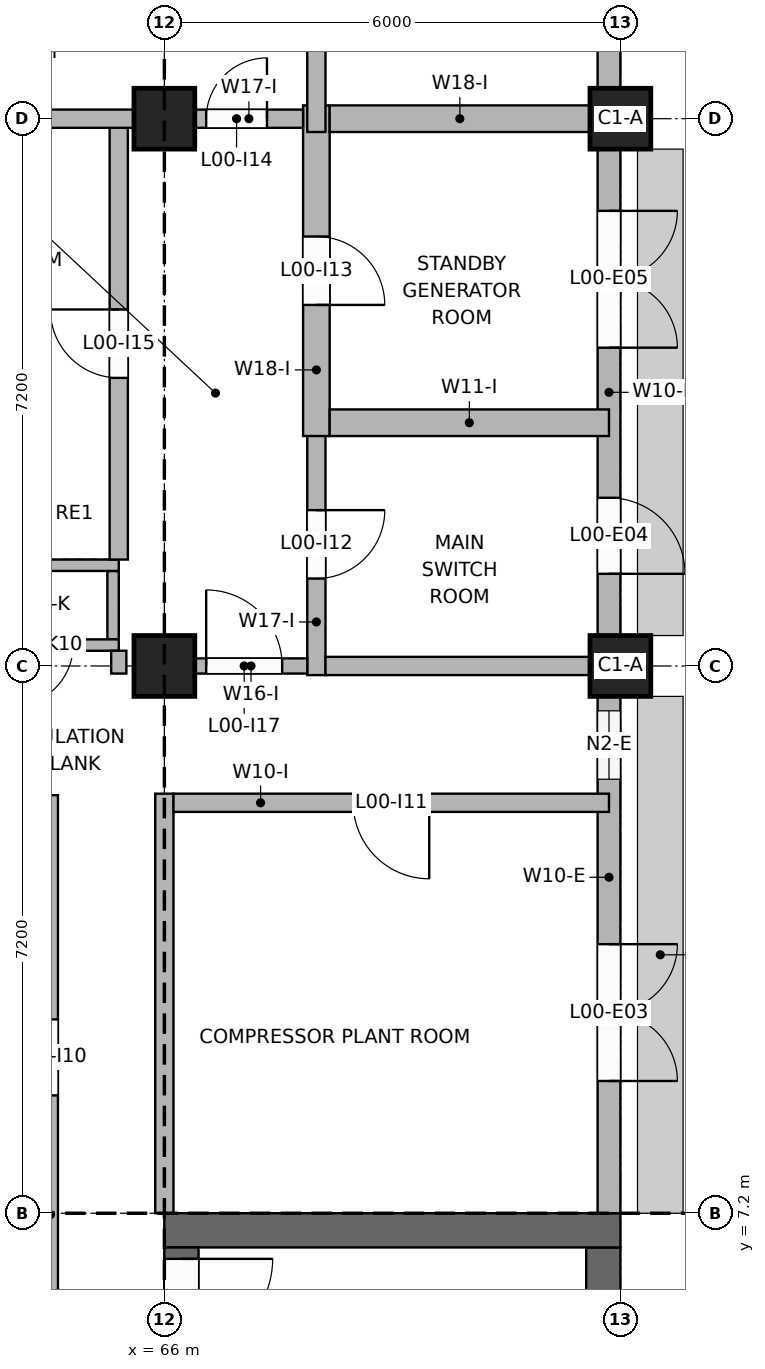
"""IFC4 building model, lengths in metres.
Left out: names, types, materials, properties, quantities, classifications, styles, units other than length and angle.
Written with IfcOpenShell. Run it as: python <this file> out.ifc"""

import sys

from ifc_helpers import new_model, si_unit, direction, frame, frame_2d, origin, origin_2d, place, context, subcontext, project, spatial, rectangle, extrude, element, fill, save


model = new_model("IFC4")
c1 = context("Model", 3, precision=1e-05, world=origin(), true_north=direction((0.0, 1.0)))
c2 = subcontext(c1, "Body", "Model", "MODEL_VIEW")
j1 = project(units=[si_unit("LENGTHUNIT", "METRE"), si_unit("PLANEANGLEUNIT", "RADIAN")], contexts=[c1])
p1 = place(None, origin())
s1 = spatial("IfcSite", under=j1, at=p1, CompositionType="ELEMENT")
p2 = place(p1, origin())
s2 = spatial("IfcBuilding", under=s1, at=p2, CompositionType="ELEMENT")
p3 = place(p2, origin())
s3 = spatial("IfcBuildingStorey", under=s2, at=p3, CompositionType="ELEMENT", Elevation=0.0)
p4 = place(p3, frame((66.0, 6.975, 0.0), z_axis=(0.0, 0.0, 1.0), x_axis=(1.0, 0.0, 0.0)))
e1 = element("IfcWall", 1, at=p4, inside=s3, PredefinedType="SHEAR", context=c2, shape_type="SweptSolid", body=[
    extrude(rectangle(XDim=6.0, YDim=0.45, at=frame_2d((3.0, 0.0))), origin(), (0.0, 0.0, 1.0), 4.0),
])
p5 = place(p3, frame((66.225, 0.45, 0.0), z_axis=(0.0, 0.0, 1.0), x_axis=(0.0, 1.0, 0.0)))
e2 = element("IfcWall", 2, at=p5, inside=s3, PredefinedType="SHEAR", context=c2, shape_type="SweptSolid", body=[
    extrude(rectangle(XDim=6.3, YDim=0.45, at=frame_2d((3.15, 0.0))), origin(), (0.0, 0.0, 1.0), 4.0),
])
p6 = place(p5, frame((4.95, 0.0, 0.0)))
e3 = element("IfcOpeningElement", 3, at=p6, cuts=e2, PredefinedType="OPENING", context=c2, shape_type="SweptSolid", body=[
    extrude(rectangle(XDim=1.2, YDim=2.1, at=frame_2d((0.6, 1.05))), frame((0.0, 0.235, 0.0), z_axis=(0.0, -1.0, 0.0), x_axis=(1.0, 0.0, 0.0)), (0.0, 0.0, 1.0), 0.47),
])
p7 = place(p3, frame((71.775, 0.45, 0.0), z_axis=(0.0, 0.0, 1.0), x_axis=(0.0, 1.0, 0.0)))
e4 = element("IfcWall", 4, at=p7, inside=s3, PredefinedType="SHEAR", context=c2, shape_type="SweptSolid", body=[
    extrude(rectangle(XDim=6.3, YDim=0.45, at=frame_2d((3.15, 0.0))), origin(), (0.0, 0.0, 1.0), 4.0),
])
p8 = place(p3, frame((63.4, 14.675, 0.0), z_axis=(0.0, 0.0, 1.0), x_axis=(1.0, 0.0, 0.0)))
e5 = element("IfcWall", 5, at=p8, inside=s3, PredefinedType="SOLIDWALL", context=c2, shape_type="SweptSolid", body=[
    extrude(rectangle(XDim=2.0, YDim=0.15, at=frame_2d((1.0, 0.0))), origin(), (0.0, 0.0, 1.0), 4.2),
])
p9 = place(p8, frame((0.6, 0.0, 0.0)))
e6 = element("IfcOpeningElement", 6, at=p9, cuts=e5, PredefinedType="OPENING", context=c2, shape_type="SweptSolid", body=[
    extrude(rectangle(XDim=0.8, YDim=2.1, at=frame_2d((0.4, 1.05))), frame((0.0, 0.085, 0.0), z_axis=(0.0, -1.0, 0.0), x_axis=(1.0, 0.0, 0.0)), (0.0, 0.0, 1.0), 0.17),
])
p10 = place(p3, frame((63.4, 15.725, 0.0), z_axis=(0.0, 0.0, 1.0), x_axis=(1.0, 0.0, 0.0)))
e7 = element("IfcWall", 7, at=p10, inside=s3, PredefinedType="SOLIDWALL", context=c2, shape_type="SweptSolid", body=[
    extrude(rectangle(XDim=2.0, YDim=0.15, at=frame_2d((1.0, 0.0))), origin(), (0.0, 0.0, 1.0), 4.2),
])
p11 = place(p3, frame((65.325, 14.75, 0.0), z_axis=(0.0, 0.0, 1.0), x_axis=(0.0, 1.0, 0.0)))
e8 = element("IfcWall", 8, at=p11, inside=s3, PredefinedType="SOLIDWALL", context=c2, shape_type="SweptSolid", body=[
    extrude(rectangle(XDim=0.9, YDim=0.15, at=frame_2d((0.45, 0.0))), origin(), (0.0, 0.0, 1.0), 4.2),
])
for number, where, z_axis, x_axis in (
    (9, (66.0, 14.4, -0.25), (0.0, 0.0, 1.0), (1.0, 0.0, 0.0)),
    (10, (72.0, 14.4, -0.25), (0.0, 0.0, 1.0), (1.0, 0.0, 0.0)),
    (11, (66.0, 21.6, -0.25), (0.0, 0.0, 1.0), (1.0, 0.0, 0.0)),
    (12, (72.0, 21.6, -0.25), (0.0, 0.0, 1.0), (1.0, 0.0, 0.0)),
):
    element("IfcColumn", number, at=place(p3, frame(where, z_axis=z_axis, x_axis=x_axis)), inside=s3, PredefinedType="COLUMN", context=c2, shape_type="SweptSolid", body=[
        extrude(rectangle(XDim=0.8, YDim=0.8, at=origin_2d()), origin(), (0.0, 0.0, 1.0), 4.25),
    ])
p12 = place(p3, frame((71.85, 7.2, 0.0), z_axis=(0.0, 0.0, 1.0), x_axis=(0.0, 1.0, 0.0)))
e13 = element("IfcWall", 13, at=p12, inside=s3, PredefinedType="SOLIDWALL", context=c2, shape_type="SweptSolid", body=[
    extrude(rectangle(XDim=6.8, YDim=0.3, at=frame_2d((3.4, 0.0))), origin(), (0.0, 0.0, 1.0), 3.1),
])
p13 = place(p12, frame((1.74, 0.0, 0.0)))
e14 = element("IfcOpeningElement", 14, at=p13, cuts=e13, PredefinedType="OPENING", context=c2, shape_type="SweptSolid", body=[
    extrude(rectangle(XDim=1.8, YDim=2.4, at=frame_2d((0.9, 1.2))), frame((0.0, 0.16, 0.0), z_axis=(0.0, -1.0, 0.0), x_axis=(1.0, 0.0, 0.0)), (0.0, 0.0, 1.0), 0.32),
])
p14 = place(p12, frame((5.71, 0.0, 0.9)))
e15 = element("IfcOpeningElement", 15, at=p14, cuts=e13, PredefinedType="OPENING", context=c2, shape_type="SweptSolid", body=[
    extrude(rectangle(XDim=0.9, YDim=1.2, at=frame_2d((0.45, 0.6))), frame((0.0, 0.16, 0.0), z_axis=(0.0, -1.0, 0.0), x_axis=(1.0, 0.0, 0.0)), (0.0, 0.0, 1.0), 0.32),
])
p15 = place(p3, frame((71.85, 14.8, 0.0), z_axis=(0.0, 0.0, 1.0), x_axis=(0.0, 1.0, 0.0)))
e16 = element("IfcWall", 16, at=p15, inside=s3, PredefinedType="SOLIDWALL", context=c2, shape_type="SweptSolid", body=[
    extrude(rectangle(XDim=6.4, YDim=0.3, at=frame_2d((3.2, 0.0))), origin(), (0.0, 0.0, 1.0), 3.1),
])
p16 = place(p15, frame((0.812, 0.0, 0.0)))
e17 = element("IfcOpeningElement", 17, at=p16, cuts=e16, PredefinedType="OPENING", context=c2, shape_type="SweptSolid", body=[
    extrude(rectangle(XDim=1.0, YDim=2.4, at=frame_2d((0.5, 1.2))), frame((0.0, 0.16, 0.0), z_axis=(0.0, -1.0, 0.0), x_axis=(1.0, 0.0, 0.0)), (0.0, 0.0, 1.0), 0.32),
])
p17 = place(p15, frame((3.788, 0.0, 0.0)))
e18 = element("IfcOpeningElement", 18, at=p17, cuts=e16, PredefinedType="OPENING", context=c2, shape_type="SweptSolid", body=[
    extrude(rectangle(XDim=1.8, YDim=2.4, at=frame_2d((0.9, 1.2))), frame((0.0, 0.16, 0.0), z_axis=(0.0, -1.0, 0.0), x_axis=(1.0, 0.0, 0.0)), (0.0, 0.0, 1.0), 0.32),
])
p18 = place(p3, frame((71.85, 22.0, 0.0), z_axis=(0.0, 0.0, 1.0), x_axis=(0.0, 1.0, 0.0)))
e19 = element("IfcWall", 19, at=p18, inside=s3, PredefinedType="SOLIDWALL", context=c2, shape_type="SweptSolid", body=[
    extrude(rectangle(XDim=5.4, YDim=0.3, at=frame_2d((2.7, 0.0))), origin(), (0.0, 0.0, 1.0), 4.0),
])
p19 = place(p18, frame((0.9, 0.0, 0.0)))
e20 = element("IfcOpeningElement", 20, at=p19, cuts=e19, PredefinedType="OPENING", context=c2, shape_type="SweptSolid", body=[
    extrude(rectangle(XDim=3.6, YDim=3.6, at=frame_2d((1.8, 1.8))), frame((0.0, 0.16, 0.0), z_axis=(0.0, -1.0, 0.0), x_axis=(1.0, 0.0, 0.0)), (0.0, 0.0, 1.0), 0.32),
])
p20 = place(p3, frame((64.5, 5.8, 0.0), z_axis=(0.0, 0.0, 1.0), x_axis=(0.0, 1.0, 0.0)))
e21 = element("IfcWall", 21, at=p20, inside=s3, PredefinedType="PARTITIONING", context=c2, shape_type="SweptSolid", body=[
    extrude(rectangle(XDim=6.9, YDim=0.2, at=frame_2d((3.45, 0.0))), origin(), (0.0, 0.0, 1.0), 3.2),
])
p21 = place(p20, frame((2.95, 0.0, 0.0)))
e22 = element("IfcOpeningElement", 22, at=p21, cuts=e21, PredefinedType="OPENING", context=c2, shape_type="SweptSolid", body=[
    extrude(rectangle(XDim=1.0, YDim=2.1, at=frame_2d((0.5, 1.05))), frame((0.0, 0.11, 0.0), z_axis=(0.0, -1.0, 0.0), x_axis=(1.0, 0.0, 0.0)), (0.0, 0.0, 1.0), 0.22),
])
p22 = place(p3, frame((65.4, 14.3, 0.0), z_axis=(0.0, 0.0, 1.0), x_axis=(0.0, 1.0, 0.0)))
e23 = element("IfcWall", 23, at=p22, inside=s3, PredefinedType="PARTITIONING", context=c2, shape_type="SweptSolid", body=[
    extrude(rectangle(XDim=0.3, YDim=0.2, at=frame_2d((0.15, 0.0))), origin(), (0.0, 0.0, 1.0), 3.2),
])
p23 = place(p3, frame((65.4, 15.8, 0.0), z_axis=(0.0, 0.0, 1.0), x_axis=(0.0, 1.0, 0.0)))
e24 = element("IfcWall", 24, at=p23, inside=s3, PredefinedType="PARTITIONING", context=c2, shape_type="SweptSolid", body=[
    extrude(rectangle(XDim=5.68, YDim=0.24, at=frame_2d((2.84, 0.0))), origin(), (0.0, 0.0, 1.0), 3.2),
])
p24 = place(p23, frame((2.39, 0.0, 0.0)))
e25 = element("IfcOpeningElement", 25, at=p24, cuts=e24, PredefinedType="OPENING", context=c2, shape_type="SweptSolid", body=[
    extrude(rectangle(XDim=0.9, YDim=2.1, at=frame_2d((0.45, 1.05))), frame((0.0, 0.13, 0.0), z_axis=(0.0, -1.0, 0.0), x_axis=(1.0, 0.0, 0.0)), (0.0, 0.0, 1.0), 0.26),
])
p25 = place(p3, frame((66.0, 7.2, 0.0), z_axis=(0.0, 0.0, 1.0), x_axis=(0.0, 1.0, 0.0)))
e26 = element("IfcWall", 26, at=p25, inside=s3, PredefinedType="PARTITIONING", context=c2, shape_type="SweptSolid", body=[
    extrude(rectangle(XDim=5.52, YDim=0.24, at=frame_2d((2.76, 0.0))), origin(), (0.0, 0.0, 1.0), 3.1),
])
p26 = place(p3, frame((68.0, 14.28, 0.0), z_axis=(0.0, 0.0, 1.0), x_axis=(0.0, 1.0, 0.0)))
e27 = element("IfcWall", 27, at=p26, inside=s3, PredefinedType="PARTITIONING", context=c2, shape_type="SweptSolid", body=[
    extrude(rectangle(XDim=3.495, YDim=0.24, at=frame_2d((1.748, 0.0))), origin(), (0.0, 0.0, 1.0), 3.2),
])
p27 = place(p26, frame((1.27, 0.0, 0.0)))
e28 = element("IfcOpeningElement", 28, at=p27, cuts=e27, PredefinedType="OPENING", context=c2, shape_type="SweptSolid", body=[
    extrude(rectangle(XDim=0.9, YDim=2.1, at=frame_2d((0.45, 1.05))), frame((0.0, 0.13, 0.0), z_axis=(0.0, -1.0, 0.0), x_axis=(1.0, 0.0, 0.0)), (0.0, 0.0, 1.0), 0.26),
])
p28 = place(p3, frame((68.0, 17.425, 0.0), z_axis=(0.0, 0.0, 1.0), x_axis=(0.0, 1.0, 0.0)))
e29 = element("IfcWall", 29, at=p28, inside=s3, PredefinedType="PARTITIONING", context=c2, shape_type="SweptSolid", body=[
    extrude(rectangle(XDim=4.35, YDim=0.35, at=frame_2d((2.175, 0.0))), origin(), (0.0, 0.0, 1.0), 3.2),
])
p29 = place(p28, frame((1.725, 0.0, 0.0)))
e30 = element("IfcOpeningElement", 30, at=p29, cuts=e29, PredefinedType="OPENING", context=c2, shape_type="SweptSolid", body=[
    extrude(rectangle(XDim=0.9, YDim=2.1, at=frame_2d((0.45, 1.05))), frame((0.0, 0.185, 0.0), z_axis=(0.0, -1.0, 0.0), x_axis=(1.0, 0.0, 0.0)), (0.0, 0.0, 1.0), 0.37),
])
p30 = place(p3, frame((68.0, 21.425, 0.0), z_axis=(0.0, 0.0, 1.0), x_axis=(0.0, 1.0, 0.0)))
e31 = element("IfcWall", 31, at=p30, inside=s3, PredefinedType="PARTITIONING", context=c2, shape_type="SweptSolid", body=[
    extrude(rectangle(XDim=3.345, YDim=0.24, at=frame_2d((1.672, 0.0))), origin(), (0.0, 0.0, 1.0), 3.2),
])
p31 = place(p3, frame((66.12, 12.6, 0.0), z_axis=(0.0, 0.0, 1.0), x_axis=(1.0, 0.0, 0.0)))
e32 = element("IfcWall", 32, at=p31, inside=s3, PredefinedType="PARTITIONING", context=c2, shape_type="SweptSolid", body=[
    extrude(rectangle(XDim=5.73, YDim=0.24, at=frame_2d((2.865, 0.0))), origin(), (0.0, 0.0, 1.0), 3.1),
])
p32 = place(p31, frame((2.365, 0.0, 0.0)))
e33 = element("IfcOpeningElement", 33, at=p32, cuts=e32, PredefinedType="OPENING", context=c2, shape_type="SweptSolid", body=[
    extrude(rectangle(XDim=1.0, YDim=2.1, at=frame_2d((0.5, 1.05))), frame((0.0, 0.13, 0.0), z_axis=(0.0, -1.0, 0.0), x_axis=(1.0, 0.0, 0.0)), (0.0, 0.0, 1.0), 0.26),
])
p33 = place(p3, frame((66.4, 14.4, 0.0), z_axis=(0.0, 0.0, 1.0), x_axis=(1.0, 0.0, 0.0)))
e34 = element("IfcWall", 34, at=p33, inside=s3, PredefinedType="PARTITIONING", context=c2, shape_type="SweptSolid", body=[
    extrude(rectangle(XDim=1.48, YDim=0.2, at=frame_2d((0.74, 0.0))), origin(), (0.0, 0.0, 1.0), 3.2),
])
p34 = place(p33, frame((0.15, 0.0, 0.0)))
e35 = element("IfcOpeningElement", 35, at=p34, cuts=e34, PredefinedType="OPENING", context=c2, shape_type="SweptSolid", body=[
    extrude(rectangle(XDim=1.0, YDim=2.1, at=frame_2d((0.5, 1.05))), frame((0.0, 0.11, 0.0), z_axis=(0.0, -1.0, 0.0), x_axis=(1.0, 0.0, 0.0)), (0.0, 0.0, 1.0), 0.22),
])
p35 = place(p3, frame((68.12, 14.4, 0.0), z_axis=(0.0, 0.0, 1.0), x_axis=(1.0, 0.0, 0.0)))
e36 = element("IfcWall", 36, at=p35, inside=s3, PredefinedType="PARTITIONING", context=c2, shape_type="SweptSolid", body=[
    extrude(rectangle(XDim=3.48, YDim=0.24, at=frame_2d((1.74, 0.0))), origin(), (0.0, 0.0, 1.0), 3.2),
])
p36 = place(p3, frame((68.175, 17.6, 0.0), z_axis=(0.0, 0.0, 1.0), x_axis=(1.0, 0.0, 0.0)))
e37 = element("IfcWall", 37, at=p36, inside=s3, PredefinedType="PARTITIONING", context=c2, shape_type="SweptSolid", body=[
    extrude(rectangle(XDim=3.675, YDim=0.35, at=frame_2d((1.837, 0.0))), origin(), (0.0, 0.0, 1.0), 3.1),
])
p37 = place(p3, frame((60.15, 21.6, 0.0), z_axis=(0.0, 0.0, 1.0), x_axis=(1.0, 0.0, 0.0)))
e38 = element("IfcWall", 38, at=p37, inside=s3, PredefinedType="PARTITIONING", context=c2, shape_type="SweptSolid", body=[
    extrude(rectangle(XDim=5.45, YDim=0.24, at=frame_2d((2.725, 0.0))), origin(), (0.0, 0.0, 1.0), 3.2),
])
p38 = place(p3, frame((66.4, 21.6, 0.0), z_axis=(0.0, 0.0, 1.0), x_axis=(1.0, 0.0, 0.0)))
e39 = element("IfcWall", 39, at=p38, inside=s3, PredefinedType="PARTITIONING", context=c2, shape_type="SweptSolid", body=[
    extrude(rectangle(XDim=1.425, YDim=0.24, at=frame_2d((0.712, 0.0))), origin(), (0.0, 0.0, 1.0), 3.2),
])
p39 = place(p38, frame((0.15, 0.0, 0.0)))
e40 = element("IfcOpeningElement", 40, at=p39, cuts=e39, PredefinedType="OPENING", context=c2, shape_type="SweptSolid", body=[
    extrude(rectangle(XDim=0.8, YDim=2.1, at=frame_2d((0.4, 1.05))), frame((0.0, 0.13, 0.0), z_axis=(0.0, -1.0, 0.0), x_axis=(1.0, 0.0, 0.0)), (0.0, 0.0, 1.0), 0.26),
])
p40 = place(p3, frame((68.175, 21.6, 0.0), z_axis=(0.0, 0.0, 1.0), x_axis=(1.0, 0.0, 0.0)))
e41 = element("IfcWall", 41, at=p40, inside=s3, PredefinedType="PARTITIONING", context=c2, shape_type="SweptSolid", body=[
    extrude(rectangle(XDim=3.425, YDim=0.35, at=frame_2d((1.712, 0.0))), origin(), (0.0, 0.0, 1.0), 3.2),
])
p41 = place(p13, frame((1.8, 0.0, 0.0), z_axis=(0.0, 0.0, 1.0), x_axis=(-1.0, 0.0, 0.0)))
e42 = element("IfcDoor", 42, at=p41, inside=s3, OperationType="DOUBLE_DOOR_SINGLE_SWING", PredefinedType="DOOR", context=c2, shape_type="SweptSolid", body=[
    extrude(rectangle(XDim=1.8, YDim=2.4, at=frame_2d((0.9, 1.2))), frame((0.0, 0.025, 0.0), z_axis=(0.0, -1.0, 0.0), x_axis=(1.0, 0.0, 0.0)), (0.0, 0.0, 1.0), 0.05),
])
fill(e14, e42)
p42 = place(p14, origin())
e43 = element("IfcWindow", 43, at=p42, inside=s3, PartitioningType="SINGLE_PANEL", PredefinedType="WINDOW", context=c2, shape_type="SweptSolid", body=[
    extrude(rectangle(XDim=0.9, YDim=1.2, at=frame_2d((0.45, 0.6))), frame((0.0, 0.03, 0.0), z_axis=(0.0, -1.0, 0.0), x_axis=(1.0, 0.0, 0.0)), (0.0, 0.0, 1.0), 0.06),
])
fill(e15, e43)
p43 = place(p16, frame((1.0, 0.0, 0.0), z_axis=(0.0, 0.0, 1.0), x_axis=(-1.0, 0.0, 0.0)))
e44 = element("IfcDoor", 44, at=p43, inside=s3, OperationType="SINGLE_SWING_RIGHT", PredefinedType="DOOR", context=c2, shape_type="SweptSolid", body=[
    extrude(rectangle(XDim=1.0, YDim=2.4, at=frame_2d((0.5, 1.2))), frame((0.0, 0.025, 0.0), z_axis=(0.0, -1.0, 0.0), x_axis=(1.0, 0.0, 0.0)), (0.0, 0.0, 1.0), 0.05),
])
fill(e17, e44)
p44 = place(p17, frame((1.8, 0.0, 0.0), z_axis=(0.0, 0.0, 1.0), x_axis=(-1.0, 0.0, 0.0)))
e45 = element("IfcDoor", 45, at=p44, inside=s3, OperationType="DOUBLE_DOOR_SINGLE_SWING", PredefinedType="DOOR", context=c2, shape_type="SweptSolid", body=[
    extrude(rectangle(XDim=1.8, YDim=2.4, at=frame_2d((0.9, 1.2))), frame((0.0, 0.025, 0.0), z_axis=(0.0, -1.0, 0.0), x_axis=(1.0, 0.0, 0.0)), (0.0, 0.0, 1.0), 0.05),
])
fill(e18, e45)
p45 = place(p9, frame((0.8, 0.0, 0.0), z_axis=(0.0, 0.0, 1.0), x_axis=(-1.0, 0.0, 0.0)))
e46 = element("IfcDoor", 46, at=p45, inside=s3, OperationType="SINGLE_SWING_RIGHT", PredefinedType="DOOR", context=c2, shape_type="SweptSolid", body=[
    extrude(rectangle(XDim=0.8, YDim=2.1, at=frame_2d((0.4, 1.05))), frame((0.0, 0.025, 0.0), z_axis=(0.0, -1.0, 0.0), x_axis=(1.0, 0.0, 0.0)), (0.0, 0.0, 1.0), 0.05),
])
fill(e6, e46)
p46 = place(p6, frame((1.2, 0.0, 0.0), z_axis=(0.0, 0.0, 1.0), x_axis=(-1.0, 0.0, 0.0)))
e47 = element("IfcDoor", 47, at=p46, inside=s3, OperationType="SINGLE_SWING_LEFT", PredefinedType="DOOR", context=c2, shape_type="SweptSolid", body=[
    extrude(rectangle(XDim=1.2, YDim=2.1, at=frame_2d((0.6, 1.05))), frame((0.0, 0.025, 0.0), z_axis=(0.0, -1.0, 0.0), x_axis=(1.0, 0.0, 0.0)), (0.0, 0.0, 1.0), 0.05),
])
fill(e3, e47)
p47 = place(p21, origin())
e48 = element("IfcDoor", 48, at=p47, inside=s3, OperationType="SINGLE_SWING_LEFT", PredefinedType="DOOR", context=c2, shape_type="SweptSolid", body=[
    extrude(rectangle(XDim=1.0, YDim=2.1, at=frame_2d((0.5, 1.05))), frame((0.0, 0.025, 0.0), z_axis=(0.0, -1.0, 0.0), x_axis=(1.0, 0.0, 0.0)), (0.0, 0.0, 1.0), 0.05),
])
fill(e22, e48)
p48 = place(p32, frame((1.0, 0.0, 0.0), z_axis=(0.0, 0.0, 1.0), x_axis=(-1.0, 0.0, 0.0)))
e49 = element("IfcDoor", 49, at=p48, inside=s3, OperationType="SINGLE_SWING_LEFT", PredefinedType="DOOR", context=c2, shape_type="SweptSolid", body=[
    extrude(rectangle(XDim=1.0, YDim=2.1, at=frame_2d((0.5, 1.05))), frame((0.0, 0.025, 0.0), z_axis=(0.0, -1.0, 0.0), x_axis=(1.0, 0.0, 0.0)), (0.0, 0.0, 1.0), 0.05),
])
fill(e33, e49)
p49 = place(p27, frame((0.9, 0.0, 0.0), z_axis=(0.0, 0.0, 1.0), x_axis=(-1.0, 0.0, 0.0)))
e50 = element("IfcDoor", 50, at=p49, inside=s3, OperationType="SINGLE_SWING_LEFT", PredefinedType="DOOR", context=c2, shape_type="SweptSolid", body=[
    extrude(rectangle(XDim=0.9, YDim=2.1, at=frame_2d((0.45, 1.05))), frame((0.0, 0.025, 0.0), z_axis=(0.0, -1.0, 0.0), x_axis=(1.0, 0.0, 0.0)), (0.0, 0.0, 1.0), 0.05),
])
fill(e28, e50)
p50 = place(p29, frame((0.9, 0.0, 0.0), z_axis=(0.0, 0.0, 1.0), x_axis=(-1.0, 0.0, 0.0)))
e51 = element("IfcDoor", 51, at=p50, inside=s3, OperationType="SINGLE_SWING_RIGHT", PredefinedType="DOOR", context=c2, shape_type="SweptSolid", body=[
    extrude(rectangle(XDim=0.9, YDim=2.1, at=frame_2d((0.45, 1.05))), frame((0.0, 0.025, 0.0), z_axis=(0.0, -1.0, 0.0), x_axis=(1.0, 0.0, 0.0)), (0.0, 0.0, 1.0), 0.05),
])
fill(e30, e51)
p51 = place(p39, origin())
e52 = element("IfcDoor", 52, at=p51, inside=s3, OperationType="SINGLE_SWING_RIGHT", PredefinedType="DOOR", context=c2, shape_type="SweptSolid", body=[
    extrude(rectangle(XDim=0.8, YDim=2.1, at=frame_2d((0.4, 1.05))), frame((0.0, 0.025, 0.0), z_axis=(0.0, -1.0, 0.0), x_axis=(1.0, 0.0, 0.0)), (0.0, 0.0, 1.0), 0.05),
])
fill(e40, e52)
p52 = place(p24, origin())
e53 = element("IfcDoor", 53, at=p52, inside=s3, OperationType="SINGLE_SWING_RIGHT", PredefinedType="DOOR", context=c2, shape_type="SweptSolid", body=[
    extrude(rectangle(XDim=0.9, YDim=2.1, at=frame_2d((0.45, 1.05))), frame((0.0, 0.025, 0.0), z_axis=(0.0, -1.0, 0.0), x_axis=(1.0, 0.0, 0.0)), (0.0, 0.0, 1.0), 0.05),
])
fill(e25, e53)
p53 = place(p34, origin())
e54 = element("IfcDoor", 54, at=p53, inside=s3, OperationType="SINGLE_SWING_LEFT", PredefinedType="DOOR", context=c2, shape_type="SweptSolid", body=[
    extrude(rectangle(XDim=1.0, YDim=2.1, at=frame_2d((0.5, 1.05))), frame((0.0, 0.025, 0.0), z_axis=(0.0, -1.0, 0.0), x_axis=(1.0, 0.0, 0.0)), (0.0, 0.0, 1.0), 0.05),
])
fill(e35, e54)
save(model, sys.argv[1])
